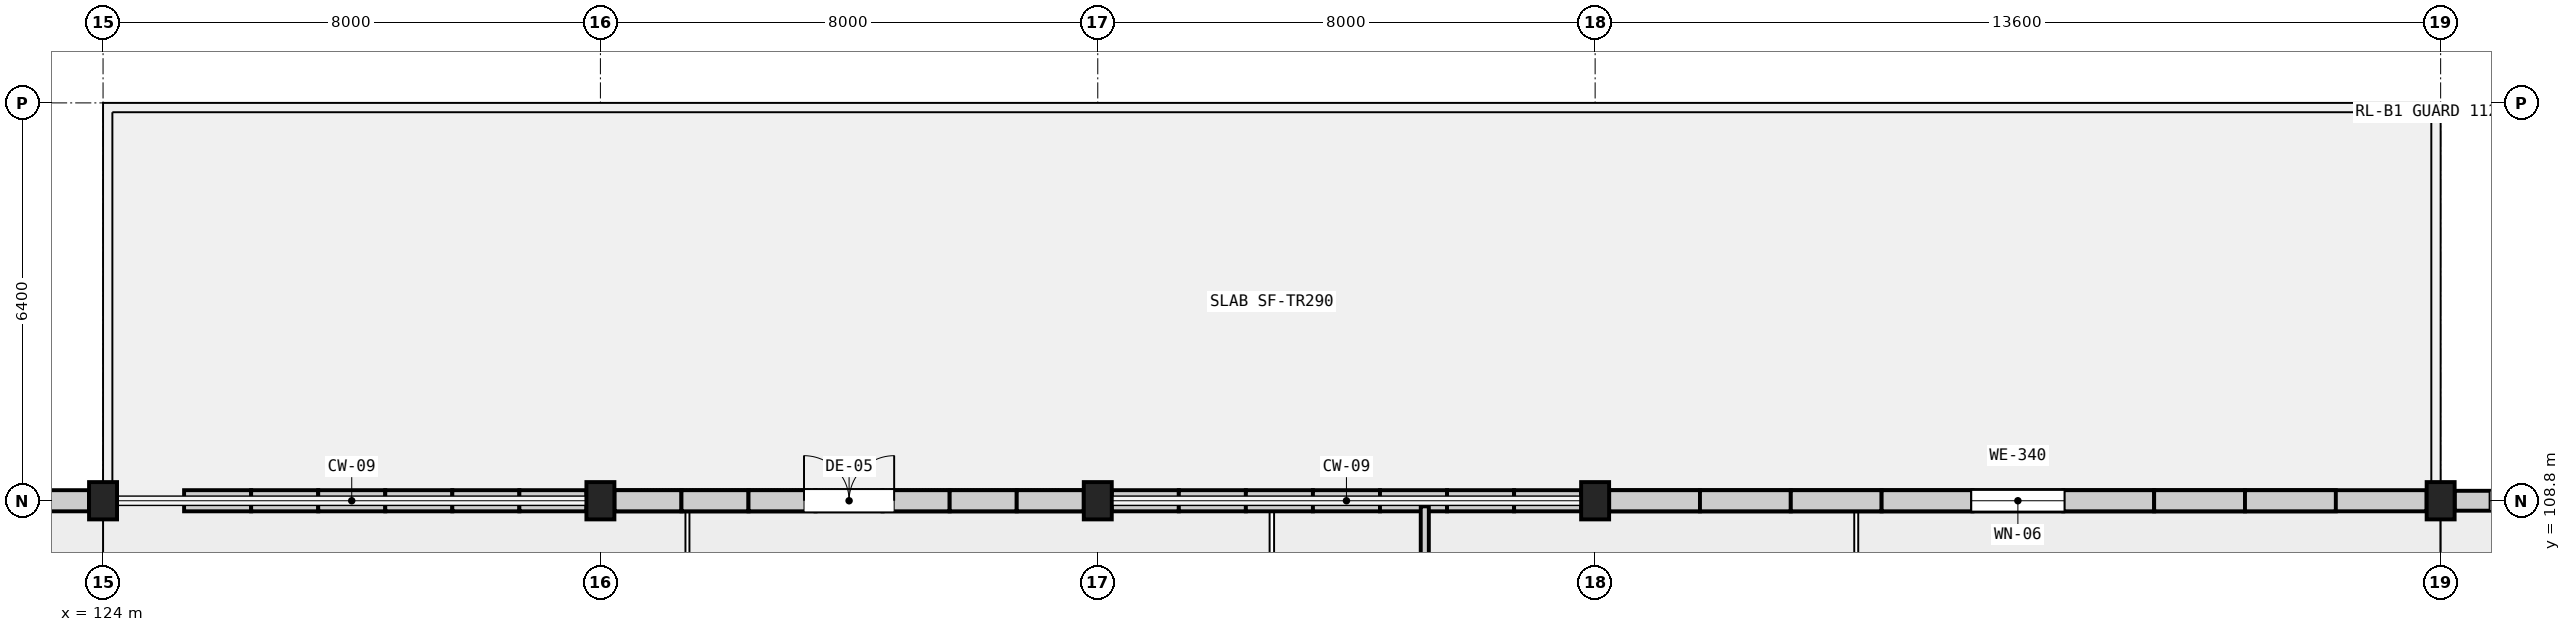
"""IFC4 building model, lengths in metres.
Left out: names, types, materials, properties, quantities, classifications, styles, units other than length and angle.
Written with IfcOpenShell. Run it as: python <this file> out.ifc"""

import sys

from ifc_helpers import new_model, si_unit, direction, frame, frame_2d, origin, origin_2d, place, context, subcontext, project, spatial, rectangle, extrude, element, fill, save


model = new_model("IFC4")
c1 = context("Model", 3, precision=1e-05, world=origin(), true_north=direction((0.0, 1.0)))
c2 = subcontext(c1, "Body", "Model", "MODEL_VIEW")
j1 = project(units=[si_unit("LENGTHUNIT", "METRE"), si_unit("PLANEANGLEUNIT", "RADIAN")], contexts=[c1])
p1 = place(None, origin())
s1 = spatial("IfcSite", under=j1, at=p1, CompositionType="ELEMENT")
p2 = place(p1, origin())
s2 = spatial("IfcBuilding", under=s1, at=p2, CompositionType="ELEMENT")
p3 = place(p2, frame((0.0, 0.0, 66.6)))
s3 = spatial("IfcBuildingStorey", under=s2, at=p3, CompositionType="ELEMENT", Elevation=66.6)
for number, where, z_axis, x_axis in (
    (1, (124.0, 108.8, 0.0), (0.0, 0.0, 1.0), (1.0, 0.0, 0.0)),
    (2, (132.0, 108.8, 0.0), (0.0, 0.0, 1.0), (1.0, 0.0, 0.0)),
    (3, (140.0, 108.8, 0.0), (0.0, 0.0, 1.0), (1.0, 0.0, 0.0)),
    (4, (148.0, 108.8, 0.0), (0.0, 0.0, 1.0), (1.0, 0.0, 0.0)),
    (5, (161.6, 108.8, 0.0), (0.0, 0.0, 1.0), (1.0, 0.0, 0.0)),
):
    element("IfcColumn", number, at=place(p3, frame(where, z_axis=z_axis, x_axis=x_axis)), inside=s3, PredefinedType="COLUMN", context=c2, shape_type="SweptSolid", body=[
        extrude(rectangle(XDim=0.45, YDim=0.6, at=origin_2d()), origin(), (0.0, 0.0, 1.0), 4.5),
    ])
p4 = place(p3, frame((164.55, 108.8, 0.0), z_axis=(0.0, 0.0, 1.0), x_axis=(-1.0, 0.0, 0.0)))
e6 = element("IfcWall", 6, at=p4, inside=s3, PredefinedType="SOLIDWALL", context=c2, shape_type="SweptSolid", body=[
    extrude(rectangle(XDim=2.725, YDim=0.32, at=frame_2d((1.363, 0.0))), origin(), (0.0, 0.0, 1.0), 3.6),
])
p5 = place(p4, frame((0.562, 0.0, 0.9)))
e7 = element("IfcOpeningElement", 7, at=p5, cuts=e6, PredefinedType="OPENING", context=c2, shape_type="SweptSolid", body=[
    extrude(rectangle(XDim=1.6, YDim=1.95, at=frame_2d((0.8, 0.975))), frame((0.0, 0.172, 0.0), z_axis=(0.0, -1.0, 0.0), x_axis=(1.0, 0.0, 0.0)), (0.0, 0.0, 1.0), 0.344),
])
p6 = place(p3, frame((161.375, 108.8, 0.0), z_axis=(0.0, 0.0, 1.0), x_axis=(-1.0, 0.0, 0.0)))
e8 = element("IfcWall", 8, at=p6, inside=s3, PredefinedType="SOLIDWALL", context=c2, shape_type="SweptSolid", body=[
    extrude(rectangle(XDim=13.15, YDim=0.34, at=frame_2d((6.575, 0.0))), origin(), (0.0, 0.0, 1.0), 3.4),
])
p7 = place(p6, frame((5.825, 0.0, 0.9)))
e9 = element("IfcOpeningElement", 9, at=p7, cuts=e8, PredefinedType="OPENING", context=c2, shape_type="SweptSolid", body=[
    extrude(rectangle(XDim=1.5, YDim=1.85, at=frame_2d((0.75, 0.925))), frame((0.0, 0.182, 0.0), z_axis=(0.0, -1.0, 0.0), x_axis=(1.0, 0.0, 0.0)), (0.0, 0.0, 1.0), 0.364),
])
p8 = place(p3, frame((139.775, 108.8, 0.0), z_axis=(0.0, 0.0, 1.0), x_axis=(-1.0, 0.0, 0.0)))
e10 = element("IfcWall", 10, at=p8, inside=s3, PredefinedType="SOLIDWALL", context=c2, shape_type="SweptSolid", body=[
    extrude(rectangle(XDim=7.55, YDim=0.34, at=frame_2d((3.775, 0.0))), origin(), (0.0, 0.0, 1.0), 3.6),
])
p9 = place(p8, frame((3.05, 0.0, 0.0)))
e11 = element("IfcOpeningElement", 11, at=p9, cuts=e10, PredefinedType="OPENING", context=c2, shape_type="SweptSolid", body=[
    extrude(rectangle(XDim=1.45, YDim=2.2, at=frame_2d((0.725, 1.1))), frame((0.0, 0.182, 0.0), z_axis=(0.0, -1.0, 0.0), x_axis=(1.0, 0.0, 0.0)), (0.0, 0.0, 1.0), 0.364),
])
p10 = place(p3, frame((123.775, 108.8, 0.0), z_axis=(0.0, 0.0, 1.0), x_axis=(-1.0, 0.0, 0.0)))
e12 = element("IfcWall", 12, at=p10, inside=s3, PredefinedType="SOLIDWALL", context=c2, shape_type="SweptSolid", body=[
    extrude(rectangle(XDim=3.525, YDim=0.34, at=frame_2d((1.762, 0.0))), origin(), (0.0, 0.0, 1.0), 3.65),
])
p11 = place(p10, frame((1.163, 0.0, 0.9)))
e13 = element("IfcOpeningElement", 13, at=p11, cuts=e12, PredefinedType="OPENING", context=c2, shape_type="SweptSolid", body=[
    extrude(rectangle(XDim=1.2, YDim=1.7, at=frame_2d((0.6, 0.85))), frame((0.0, 0.182, 0.0), z_axis=(0.0, -1.0, 0.0), x_axis=(1.0, 0.0, 0.0)), (0.0, 0.0, 1.0), 0.364),
])
p12 = place(p3, frame((125.304, 108.8, 4.5), z_axis=(0.0, 0.0, 1.0), x_axis=(1.0, 0.0, 0.0)))
e14 = element("IfcWall", 14, at=p12, inside=s3, PredefinedType="SOLIDWALL", context=c2, shape_type="SweptSolid", body=[
    extrude(rectangle(XDim=1.078, YDim=0.34, at=frame_2d((0.539, 0.0))), origin(), (0.0, 0.0, 1.0), 0.272),
])
p13 = place(p3, frame((126.382, 108.8, 4.5), z_axis=(0.0, 0.0, 1.0), x_axis=(1.0, 0.0, 0.0)))
e15 = element("IfcWall", 15, at=p13, inside=s3, PredefinedType="SOLIDWALL", context=c2, shape_type="SweptSolid", body=[
    extrude(rectangle(XDim=1.079, YDim=0.34, at=frame_2d((0.539, 0.0))), origin(), (0.0, 0.0, 1.0), 0.498),
])
p14 = place(p3, frame((127.461, 108.8, 4.5), z_axis=(0.0, 0.0, 1.0), x_axis=(1.0, 0.0, 0.0)))
e16 = element("IfcWall", 16, at=p14, inside=s3, PredefinedType="SOLIDWALL", context=c2, shape_type="SweptSolid", body=[
    extrude(rectangle(XDim=1.079, YDim=0.34, at=frame_2d((0.539, 0.0))), origin(), (0.0, 0.0, 1.0), 0.723),
])
p15 = place(p3, frame((128.539, 108.8, 4.5), z_axis=(0.0, 0.0, 1.0), x_axis=(1.0, 0.0, 0.0)))
e17 = element("IfcWall", 17, at=p15, inside=s3, PredefinedType="SOLIDWALL", context=c2, shape_type="SweptSolid", body=[
    extrude(rectangle(XDim=1.079, YDim=0.34, at=frame_2d((0.539, 0.0))), origin(), (0.0, 0.0, 1.0), 0.948),
])
p16 = place(p3, frame((129.618, 108.8, 4.5), z_axis=(0.0, 0.0, 1.0), x_axis=(1.0, 0.0, 0.0)))
e18 = element("IfcWall", 18, at=p16, inside=s3, PredefinedType="SOLIDWALL", context=c2, shape_type="SweptSolid", body=[
    extrude(rectangle(XDim=1.078, YDim=0.34, at=frame_2d((0.539, 0.0))), origin(), (0.0, 0.0, 1.0), 1.174),
])
p17 = place(p3, frame((130.696, 108.8, 4.5), z_axis=(0.0, 0.0, 1.0), x_axis=(1.0, 0.0, 0.0)))
e19 = element("IfcWall", 19, at=p17, inside=s3, PredefinedType="SOLIDWALL", context=c2, shape_type="SweptSolid", body=[
    extrude(rectangle(XDim=1.079, YDim=0.34, at=frame_2d((0.539, 0.0))), origin(), (0.0, 0.0, 1.0), 1.399),
])
p18 = place(p3, frame((132.225, 108.8, 4.5), z_axis=(0.0, 0.0, 1.0), x_axis=(1.0, 0.0, 0.0)))
e20 = element("IfcWall", 20, at=p18, inside=s3, PredefinedType="SOLIDWALL", context=c2, shape_type="SweptSolid", body=[
    extrude(rectangle(XDim=1.079, YDim=0.34, at=frame_2d((0.539, 0.0))), origin(), (0.0, 0.0, 1.0), 1.718),
])
p19 = place(p3, frame((133.304, 108.8, 4.5), z_axis=(0.0, 0.0, 1.0), x_axis=(1.0, 0.0, 0.0)))
e21 = element("IfcWall", 21, at=p19, inside=s3, PredefinedType="SOLIDWALL", context=c2, shape_type="SweptSolid", body=[
    extrude(rectangle(XDim=1.078, YDim=0.34, at=frame_2d((0.539, 0.0))), origin(), (0.0, 0.0, 1.0), 1.944),
])
p20 = place(p3, frame((134.382, 108.8, 4.5), z_axis=(0.0, 0.0, 1.0), x_axis=(1.0, 0.0, 0.0)))
e22 = element("IfcWall", 22, at=p20, inside=s3, PredefinedType="SOLIDWALL", context=c2, shape_type="SweptSolid", body=[
    extrude(rectangle(XDim=1.079, YDim=0.34, at=frame_2d((0.539, 0.0))), origin(), (0.0, 0.0, 1.0), 2.14),
])
p21 = place(p3, frame((135.461, 108.8, 4.5), z_axis=(0.0, 0.0, 1.0), x_axis=(1.0, 0.0, 0.0)))
e23 = element("IfcWall", 23, at=p21, inside=s3, PredefinedType="SOLIDWALL", context=c2, shape_type="SweptSolid", body=[
    extrude(rectangle(XDim=1.079, YDim=0.34, at=frame_2d((0.539, 0.0))), origin(), (0.0, 0.0, 1.0), 2.334),
])
p22 = place(p3, frame((136.539, 108.8, 4.5), z_axis=(0.0, 0.0, 1.0), x_axis=(1.0, 0.0, 0.0)))
e24 = element("IfcWall", 24, at=p22, inside=s3, PredefinedType="SOLIDWALL", context=c2, shape_type="SweptSolid", body=[
    extrude(rectangle(XDim=1.079, YDim=0.34, at=frame_2d((0.539, 0.0))), origin(), (0.0, 0.0, 1.0), 2.529),
])
p23 = place(p3, frame((137.618, 108.8, 4.5), z_axis=(0.0, 0.0, 1.0), x_axis=(1.0, 0.0, 0.0)))
e25 = element("IfcWall", 25, at=p23, inside=s3, PredefinedType="SOLIDWALL", context=c2, shape_type="SweptSolid", body=[
    extrude(rectangle(XDim=1.078, YDim=0.34, at=frame_2d((0.539, 0.0))), origin(), (0.0, 0.0, 1.0), 2.723),
])
p24 = place(p3, frame((138.696, 108.8, 4.5), z_axis=(0.0, 0.0, 1.0), x_axis=(1.0, 0.0, 0.0)))
e26 = element("IfcWall", 26, at=p24, inside=s3, PredefinedType="SOLIDWALL", context=c2, shape_type="SweptSolid", body=[
    extrude(rectangle(XDim=1.079, YDim=0.34, at=frame_2d((0.539, 0.0))), origin(), (0.0, 0.0, 1.0), 2.917),
])
p25 = place(p3, frame((140.225, 108.8, 4.5), z_axis=(0.0, 0.0, 1.0), x_axis=(1.0, 0.0, 0.0)))
e27 = element("IfcWall", 27, at=p25, inside=s3, PredefinedType="SOLIDWALL", context=c2, shape_type="SweptSolid", body=[
    extrude(rectangle(XDim=1.079, YDim=0.34, at=frame_2d((0.539, 0.0))), origin(), (0.0, 0.0, 1.0), 3.192),
])
p26 = place(p3, frame((141.304, 108.8, 4.5), z_axis=(0.0, 0.0, 1.0), x_axis=(1.0, 0.0, 0.0)))
e28 = element("IfcWall", 28, at=p26, inside=s3, PredefinedType="SOLIDWALL", context=c2, shape_type="SweptSolid", body=[
    extrude(rectangle(XDim=1.078, YDim=0.34, at=frame_2d((0.539, 0.0))), origin(), (0.0, 0.0, 1.0), 3.386),
])
p27 = place(p3, frame((142.382, 108.8, 4.5), z_axis=(0.0, 0.0, 1.0), x_axis=(1.0, 0.0, 0.0)))
e29 = element("IfcWall", 29, at=p27, inside=s3, PredefinedType="SOLIDWALL", context=c2, shape_type="SweptSolid", body=[
    extrude(rectangle(XDim=1.079, YDim=0.34, at=frame_2d((0.539, 0.0))), origin(), (0.0, 0.0, 1.0), 3.536),
])
p28 = place(p3, frame((143.461, 108.8, 4.5), z_axis=(0.0, 0.0, 1.0), x_axis=(1.0, 0.0, 0.0)))
e30 = element("IfcWall", 30, at=p28, inside=s3, PredefinedType="SOLIDWALL", context=c2, shape_type="SweptSolid", body=[
    extrude(rectangle(XDim=1.079, YDim=0.34, at=frame_2d((0.539, 0.0))), origin(), (0.0, 0.0, 1.0), 3.342),
])
p29 = place(p3, frame((144.539, 108.8, 4.5), z_axis=(0.0, 0.0, 1.0), x_axis=(1.0, 0.0, 0.0)))
e31 = element("IfcWall", 31, at=p29, inside=s3, PredefinedType="SOLIDWALL", context=c2, shape_type="SweptSolid", body=[
    extrude(rectangle(XDim=1.079, YDim=0.34, at=frame_2d((0.539, 0.0))), origin(), (0.0, 0.0, 1.0), 3.148),
])
p30 = place(p3, frame((145.618, 108.8, 4.5), z_axis=(0.0, 0.0, 1.0), x_axis=(1.0, 0.0, 0.0)))
e32 = element("IfcWall", 32, at=p30, inside=s3, PredefinedType="SOLIDWALL", context=c2, shape_type="SweptSolid", body=[
    extrude(rectangle(XDim=1.078, YDim=0.34, at=frame_2d((0.539, 0.0))), origin(), (0.0, 0.0, 1.0), 2.954),
])
p31 = place(p3, frame((146.696, 108.8, 4.5), z_axis=(0.0, 0.0, 1.0), x_axis=(1.0, 0.0, 0.0)))
e33 = element("IfcWall", 33, at=p31, inside=s3, PredefinedType="SOLIDWALL", context=c2, shape_type="SweptSolid", body=[
    extrude(rectangle(XDim=1.079, YDim=0.34, at=frame_2d((0.539, 0.0))), origin(), (0.0, 0.0, 1.0), 2.76),
])
p32 = place(p3, frame((148.225, 108.8, 4.5), z_axis=(0.0, 0.0, 1.0), x_axis=(1.0, 0.0, 0.0)))
e34 = element("IfcWall", 34, at=p32, inside=s3, PredefinedType="SOLIDWALL", context=c2, shape_type="SweptSolid", body=[
    extrude(rectangle(XDim=1.461, YDim=0.34, at=frame_2d((0.73, 0.0))), origin(), (0.0, 0.0, 1.0), 2.416),
])
p33 = place(p3, frame((149.686, 108.8, 4.5), z_axis=(0.0, 0.0, 1.0), x_axis=(1.0, 0.0, 0.0)))
e35 = element("IfcWall", 35, at=p33, inside=s3, PredefinedType="SOLIDWALL", context=c2, shape_type="SweptSolid", body=[
    extrude(rectangle(XDim=1.461, YDim=0.34, at=frame_2d((0.73, 0.0))), origin(), (0.0, 0.0, 1.0), 2.153),
])
p34 = place(p3, frame((151.147, 108.8, 4.5), z_axis=(0.0, 0.0, 1.0), x_axis=(1.0, 0.0, 0.0)))
e36 = element("IfcWall", 36, at=p34, inside=s3, PredefinedType="SOLIDWALL", context=c2, shape_type="SweptSolid", body=[
    extrude(rectangle(XDim=1.461, YDim=0.34, at=frame_2d((0.73, 0.0))), origin(), (0.0, 0.0, 1.0), 1.878),
])
p35 = place(p3, frame((152.608, 108.8, 4.5), z_axis=(0.0, 0.0, 1.0), x_axis=(1.0, 0.0, 0.0)))
e37 = element("IfcWall", 37, at=p35, inside=s3, PredefinedType="SOLIDWALL", context=c2, shape_type="SweptSolid", body=[
    extrude(rectangle(XDim=1.461, YDim=0.34, at=frame_2d((0.73, 0.0))), origin(), (0.0, 0.0, 1.0), 1.573),
])
p36 = place(p3, frame((154.069, 108.8, 4.5), z_axis=(0.0, 0.0, 1.0), x_axis=(1.0, 0.0, 0.0)))
e38 = element("IfcWall", 38, at=p36, inside=s3, PredefinedType="SOLIDWALL", context=c2, shape_type="SweptSolid", body=[
    extrude(rectangle(XDim=1.461, YDim=0.34, at=frame_2d((0.73, 0.0))), origin(), (0.0, 0.0, 1.0), 1.268),
])
p37 = place(p3, frame((155.531, 108.8, 4.5), z_axis=(0.0, 0.0, 1.0), x_axis=(1.0, 0.0, 0.0)))
e39 = element("IfcWall", 39, at=p37, inside=s3, PredefinedType="SOLIDWALL", context=c2, shape_type="SweptSolid", body=[
    extrude(rectangle(XDim=1.461, YDim=0.34, at=frame_2d((0.73, 0.0))), origin(), (0.0, 0.0, 1.0), 0.963),
])
p38 = place(p3, frame((156.992, 108.8, 4.5), z_axis=(0.0, 0.0, 1.0), x_axis=(1.0, 0.0, 0.0)))
e40 = element("IfcWall", 40, at=p38, inside=s3, PredefinedType="SOLIDWALL", context=c2, shape_type="SweptSolid", body=[
    extrude(rectangle(XDim=1.461, YDim=0.34, at=frame_2d((0.73, 0.0))), origin(), (0.0, 0.0, 1.0), 0.657),
])
p39 = place(p3, frame((158.453, 108.8, 4.5), z_axis=(0.0, 0.0, 1.0), x_axis=(1.0, 0.0, 0.0)))
e41 = element("IfcWall", 41, at=p39, inside=s3, PredefinedType="SOLIDWALL", context=c2, shape_type="SweptSolid", body=[
    extrude(rectangle(XDim=1.461, YDim=0.34, at=frame_2d((0.73, 0.0))), origin(), (0.0, 0.0, 1.0), 0.352),
])
p40 = place(p3, frame((145.26, 98.54, 0.0), z_axis=(0.0, 0.0, 1.0), x_axis=(0.0, 1.0, 0.0)))
e42 = element("IfcWall", 42, at=p40, inside=s3, PredefinedType="PARTITIONING", context=c2, shape_type="SweptSolid", body=[
    extrude(rectangle(XDim=10.17, YDim=0.13, at=frame_2d((5.085, 0.0))), origin(), (0.0, 0.0, 1.0), 3.55),
])
p41 = place(p5, origin())
e43 = element("IfcWindow", 43, at=p41, inside=s3, PartitioningType="DOUBLE_PANEL_VERTICAL", PredefinedType="WINDOW", context=c2, shape_type="SweptSolid", body=[
    extrude(rectangle(XDim=1.6, YDim=1.95, at=frame_2d((0.8, 0.975))), frame((0.0, 0.03, 0.0), z_axis=(0.0, -1.0, 0.0), x_axis=(1.0, 0.0, 0.0)), (0.0, 0.0, 1.0), 0.06),
])
fill(e7, e43)
p42 = place(p7, origin())
e44 = element("IfcWindow", 44, at=p42, inside=s3, PartitioningType="SINGLE_PANEL", PredefinedType="WINDOW", context=c2, shape_type="SweptSolid", body=[
    extrude(rectangle(XDim=1.5, YDim=1.85, at=frame_2d((0.75, 0.925))), frame((0.0, 0.03, 0.0), z_axis=(0.0, -1.0, 0.0), x_axis=(1.0, 0.0, 0.0)), (0.0, 0.0, 1.0), 0.06),
])
fill(e9, e44)
p43 = place(p9, frame((1.45, 0.0, 0.0), z_axis=(0.0, 0.0, 1.0), x_axis=(-1.0, 0.0, 0.0)))
e45 = element("IfcDoor", 45, at=p43, inside=s3, OperationType="DOUBLE_DOOR_SINGLE_SWING", PredefinedType="DOOR", context=c2, shape_type="SweptSolid", body=[
    extrude(rectangle(XDim=1.45, YDim=2.2, at=frame_2d((0.725, 1.1))), frame((0.0, 0.025, 0.0), z_axis=(0.0, -1.0, 0.0), x_axis=(1.0, 0.0, 0.0)), (0.0, 0.0, 1.0), 0.05),
])
fill(e11, e45)
save(model, sys.argv[1])
